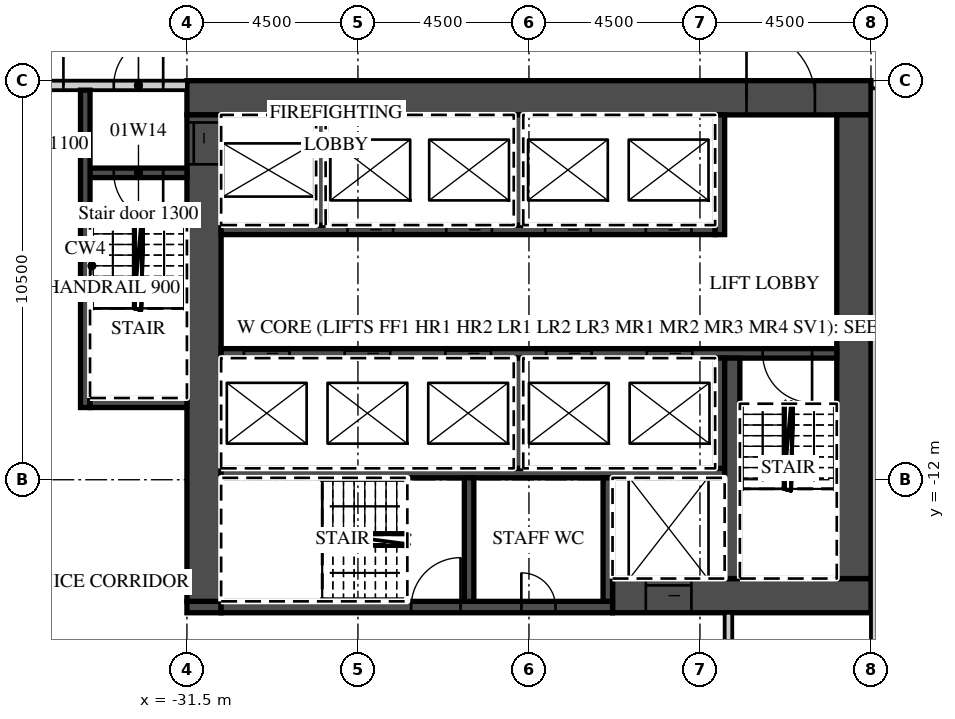
"""IFC4 building model, lengths in metres.
Left out: names, types, materials, properties, quantities, classifications, styles, units other than length and angle.
Written with IfcOpenShell. Run it as: python <this file> out.ifc"""

import sys

from ifc_helpers import new_model, si_unit, direction, frame, frame_2d, origin, place, context, subcontext, project, spatial, rectangle, extrude, element, fill, save


model = new_model("IFC4")
c1 = context("Model", 3, precision=1e-05, world=origin(), true_north=direction((0.0, 1.0)))
c2 = subcontext(c1, "Body", "Model", "MODEL_VIEW")
j1 = project(units=[si_unit("LENGTHUNIT", "METRE"), si_unit("PLANEANGLEUNIT", "RADIAN")], contexts=[c1])
p1 = place(None, origin())
s1 = spatial("IfcSite", under=j1, at=p1, CompositionType="ELEMENT")
p2 = place(p1, origin())
s2 = spatial("IfcBuilding", under=s1, at=p2, CompositionType="ELEMENT")
p3 = place(p2, frame((0.0, 0.0, 11.0)))
s3 = spatial("IfcBuildingStorey", under=s2, at=p3, CompositionType="ELEMENT", Elevation=11.0)
p4 = place(p3, frame((-31.5, -1.95, 0.0), z_axis=(0.0, 0.0, 1.0), x_axis=(1.0, 0.0, 0.0)))
e1 = element("IfcWall", 1, at=p4, inside=s3, PredefinedType="SHEAR", context=c2, shape_type="SweptSolid", body=[
    extrude(rectangle(XDim=18.0, YDim=0.9, at=frame_2d((9.0, 0.0))), origin(), (0.0, 0.0, 1.0), 5.55),
])
p5 = place(p4, frame((14.725, 0.0, 0.0)))
e2 = element("IfcOpeningElement", 2, at=p5, cuts=e1, PredefinedType="OPENING", context=c2, shape_type="SweptSolid", body=[
    extrude(rectangle(XDim=1.8, YDim=2.1, at=frame_2d((0.9, 1.05))), frame((0.0, 0.46, 0.0), z_axis=(0.0, -1.0, 0.0), x_axis=(1.0, 0.0, 0.0)), (0.0, 0.0, 1.0), 0.92),
])
p6 = place(p3, frame((-20.3, -15.05, 0.0), z_axis=(0.0, 0.0, 1.0), x_axis=(1.0, 0.0, 0.0)))
e3 = element("IfcWall", 3, at=p6, inside=s3, PredefinedType="SHEAR", context=c2, shape_type="SweptSolid", body=[
    extrude(rectangle(XDim=6.8, YDim=0.9, at=frame_2d((3.4, 0.0))), origin(), (0.0, 0.0, 1.0), 5.55),
])
p7 = place(p6, frame((0.875, 0.0, 0.0)))
e4 = element("IfcOpeningElement", 4, at=p7, cuts=e3, PredefinedType="OPENING", context=c2, shape_type="SweptSolid", body=[
    extrude(rectangle(XDim=1.2, YDim=2.1, at=frame_2d((0.6, 1.05))), frame((0.0, 0.46, 0.0), z_axis=(0.0, -1.0, 0.0), x_axis=(1.0, 0.0, 0.0)), (0.0, 0.0, 1.0), 0.92),
])
p8 = place(p3, frame((-31.5, -15.35, 0.0), z_axis=(0.0, 0.0, 1.0), x_axis=(1.0, 0.0, 0.0)))
e5 = element("IfcWall", 5, at=p8, inside=s3, PredefinedType="SHEAR", context=c2, shape_type="SweptSolid", body=[
    extrude(rectangle(XDim=0.9, YDim=0.3, at=frame_2d((0.45, 0.0))), origin(), (0.0, 0.0, 1.0), 5.55),
])
p9 = place(p3, frame((-30.6, -15.35, 0.0), z_axis=(0.0, 0.0, 1.0), x_axis=(1.0, 0.0, 0.0)))
e6 = element("IfcWall", 6, at=p9, inside=s3, PredefinedType="SHEAR", context=c2, shape_type="SweptSolid", body=[
    extrude(rectangle(XDim=10.3, YDim=0.3, at=frame_2d((5.15, 0.0))), origin(), (0.0, 0.0, 1.0), 5.55),
])
p10 = place(p9, frame((5.0, 0.0, 0.0)))
e7 = element("IfcOpeningElement", 7, at=p10, cuts=e6, PredefinedType="OPENING", context=c2, shape_type="SweptSolid", body=[
    extrude(rectangle(XDim=1.3, YDim=2.1, at=frame_2d((0.65, 1.05))), frame((0.0, 0.16, 0.0), z_axis=(0.0, -1.0, 0.0), x_axis=(1.0, 0.0, 0.0)), (0.0, 0.0, 1.0), 0.32),
])
p11 = place(p9, frame((7.9, 0.0, 0.0)))
e8 = element("IfcOpeningElement", 8, at=p11, cuts=e6, PredefinedType="OPENING", context=c2, shape_type="SweptSolid", body=[
    extrude(rectangle(XDim=0.9, YDim=2.1, at=frame_2d((0.45, 1.05))), frame((0.0, 0.16, 0.0), z_axis=(0.0, -1.0, 0.0), x_axis=(1.0, 0.0, 0.0)), (0.0, 0.0, 1.0), 0.32),
])
p12 = place(p3, frame((-31.05, -15.2, 0.0), z_axis=(0.0, 0.0, 1.0), x_axis=(0.0, 1.0, 0.0)))
e9 = element("IfcWall", 9, at=p12, inside=s3, PredefinedType="SHEAR", context=c2, shape_type="SweptSolid", body=[
    extrude(rectangle(XDim=12.8, YDim=0.9, at=frame_2d((6.4, 0.0))), origin(), (0.0, 0.0, 1.0), 5.55),
])
p13 = place(p12, frame((11.5, 0.0, 0.0)))
e10 = element("IfcOpeningElement", 10, at=p13, cuts=e9, PredefinedType="OPENING", context=c2, shape_type="SweptSolid", body=[
    extrude(rectangle(XDim=1.1, YDim=2.1, at=frame_2d((0.55, 1.05))), frame((0.0, 0.46, 0.0), z_axis=(0.0, -1.0, 0.0), x_axis=(1.0, 0.0, 0.0)), (0.0, 0.0, 1.0), 0.92),
])
p14 = place(p3, frame((-13.95, -14.6, 0.0), z_axis=(0.0, 0.0, 1.0), x_axis=(0.0, 1.0, 0.0)))
e11 = element("IfcWall", 11, at=p14, inside=s3, PredefinedType="SHEAR", context=c2, shape_type="SweptSolid", body=[
    extrude(rectangle(XDim=12.2, YDim=0.9, at=frame_2d((6.1, 0.0))), origin(), (0.0, 0.0, 1.0), 5.55),
])
p15 = place(p3, frame((-30.6, -5.425, 0.0), z_axis=(0.0, 0.0, 1.0), x_axis=(1.0, 0.0, 0.0)))
e12 = element("IfcWall", 12, at=p15, inside=s3, PredefinedType="SHEAR", context=c2, shape_type="SweptSolid", body=[
    extrude(rectangle(XDim=13.0, YDim=0.25, at=frame_2d((6.5, 0.0))), origin(), (0.0, 0.0, 1.0), 5.55),
])
p16 = place(p15, frame((3.325, 0.0, 0.0)))
e13 = element("IfcOpeningElement", 13, at=p16, cuts=e12, PredefinedType="OPENING", context=c2, shape_type="SweptSolid", body=[
    extrude(rectangle(XDim=1.2, YDim=2.1, at=frame_2d((0.6, 1.05))), frame((0.0, 0.135, 0.0), z_axis=(0.0, -1.0, 0.0), x_axis=(1.0, 0.0, 0.0)), (0.0, 0.0, 1.0), 0.27),
])
p17 = place(p15, frame((5.925, 0.0, 0.0)))
e14 = element("IfcOpeningElement", 14, at=p17, cuts=e12, PredefinedType="OPENING", context=c2, shape_type="SweptSolid", body=[
    extrude(rectangle(XDim=1.2, YDim=2.1, at=frame_2d((0.6, 1.05))), frame((0.0, 0.135, 0.0), z_axis=(0.0, -1.0, 0.0), x_axis=(1.0, 0.0, 0.0)), (0.0, 0.0, 1.0), 0.27),
])
p18 = place(p15, frame((8.525, 0.0, 0.0)))
e15 = element("IfcOpeningElement", 15, at=p18, cuts=e12, PredefinedType="OPENING", context=c2, shape_type="SweptSolid", body=[
    extrude(rectangle(XDim=1.2, YDim=2.1, at=frame_2d((0.6, 1.05))), frame((0.0, 0.135, 0.0), z_axis=(0.0, -1.0, 0.0), x_axis=(1.0, 0.0, 0.0)), (0.0, 0.0, 1.0), 0.27),
])
p19 = place(p15, frame((11.175, 0.0, 0.0)))
e16 = element("IfcOpeningElement", 16, at=p19, cuts=e12, PredefinedType="OPENING", context=c2, shape_type="SweptSolid", body=[
    extrude(rectangle(XDim=1.2, YDim=2.1, at=frame_2d((0.6, 1.05))), frame((0.0, 0.135, 0.0), z_axis=(0.0, -1.0, 0.0), x_axis=(1.0, 0.0, 0.0)), (0.0, 0.0, 1.0), 0.27),
])
p20 = place(p3, frame((-17.475, -5.55, 0.0), z_axis=(0.0, 0.0, 1.0), x_axis=(0.0, 1.0, 0.0)))
e17 = element("IfcWall", 17, at=p20, inside=s3, PredefinedType="SHEAR", context=c2, shape_type="SweptSolid", body=[
    extrude(rectangle(XDim=3.15, YDim=0.25, at=frame_2d((1.575, 0.0))), origin(), (0.0, 0.0, 1.0), 5.55),
])
for number, where, z_axis, x_axis in (
    (18, (-27.975, -5.3, 0.0), (0.0, 0.0, 1.0), (0.0, 1.0, 0.0)),
    (19, (-22.775, -5.3, 0.0), (0.0, 0.0, 1.0), (0.0, 1.0, 0.0)),
):
    element("IfcWall", number, at=place(p3, frame(where, z_axis=z_axis, x_axis=x_axis)), inside=s3, PredefinedType="SHEAR", context=c2, shape_type="SweptSolid", body=[
        extrude(rectangle(XDim=2.9, YDim=0.25, at=frame_2d((1.45, 0.0))), origin(), (0.0, 0.0, 1.0), 5.55),
    ])
p21 = place(p3, frame((-30.6, -8.675, 0.0), z_axis=(0.0, 0.0, 1.0), x_axis=(1.0, 0.0, 0.0)))
e20 = element("IfcWall", 20, at=p21, inside=s3, PredefinedType="SHEAR", context=c2, shape_type="SweptSolid", body=[
    extrude(rectangle(XDim=16.2, YDim=0.25, at=frame_2d((8.1, 0.0))), origin(), (0.0, 0.0, 1.0), 5.55),
])
p22 = place(p21, frame((0.6, 0.0, 0.0)))
e21 = element("IfcOpeningElement", 21, at=p22, cuts=e20, PredefinedType="OPENING", context=c2, shape_type="SweptSolid", body=[
    extrude(rectangle(XDim=1.2, YDim=2.1, at=frame_2d((0.6, 1.05))), frame((0.0, 0.135, 0.0), z_axis=(0.0, -1.0, 0.0), x_axis=(1.0, 0.0, 0.0)), (0.0, 0.0, 1.0), 0.27),
])
p23 = place(p21, frame((3.25, 0.0, 0.0)))
e22 = element("IfcOpeningElement", 22, at=p23, cuts=e20, PredefinedType="OPENING", context=c2, shape_type="SweptSolid", body=[
    extrude(rectangle(XDim=1.2, YDim=2.1, at=frame_2d((0.6, 1.05))), frame((0.0, 0.135, 0.0), z_axis=(0.0, -1.0, 0.0), x_axis=(1.0, 0.0, 0.0)), (0.0, 0.0, 1.0), 0.27),
])
p24 = place(p21, frame((5.9, 0.0, 0.0)))
e23 = element("IfcOpeningElement", 23, at=p24, cuts=e20, PredefinedType="OPENING", context=c2, shape_type="SweptSolid", body=[
    extrude(rectangle(XDim=1.2, YDim=2.1, at=frame_2d((0.6, 1.05))), frame((0.0, 0.135, 0.0), z_axis=(0.0, -1.0, 0.0), x_axis=(1.0, 0.0, 0.0)), (0.0, 0.0, 1.0), 0.27),
])
p25 = place(p21, frame((8.55, 0.0, 0.0)))
e24 = element("IfcOpeningElement", 24, at=p25, cuts=e20, PredefinedType="OPENING", context=c2, shape_type="SweptSolid", body=[
    extrude(rectangle(XDim=1.2, YDim=2.1, at=frame_2d((0.6, 1.05))), frame((0.0, 0.135, 0.0), z_axis=(0.0, -1.0, 0.0), x_axis=(1.0, 0.0, 0.0)), (0.0, 0.0, 1.0), 0.27),
])
p26 = place(p21, frame((11.2, 0.0, 0.0)))
e25 = element("IfcOpeningElement", 25, at=p26, cuts=e20, PredefinedType="OPENING", context=c2, shape_type="SweptSolid", body=[
    extrude(rectangle(XDim=1.2, YDim=2.1, at=frame_2d((0.6, 1.05))), frame((0.0, 0.135, 0.0), z_axis=(0.0, -1.0, 0.0), x_axis=(1.0, 0.0, 0.0)), (0.0, 0.0, 1.0), 0.27),
])
p27 = place(p21, frame((14.25, 0.0, 0.0)))
e26 = element("IfcOpeningElement", 26, at=p27, cuts=e20, PredefinedType="OPENING", context=c2, shape_type="SweptSolid", body=[
    extrude(rectangle(XDim=1.3, YDim=2.1, at=frame_2d((0.65, 1.05))), frame((0.0, 0.135, 0.0), z_axis=(0.0, -1.0, 0.0), x_axis=(1.0, 0.0, 0.0)), (0.0, 0.0, 1.0), 0.27),
])
p28 = place(p3, frame((-30.6, -11.825, 0.0), z_axis=(0.0, 0.0, 1.0), x_axis=(1.0, 0.0, 0.0)))
e27 = element("IfcWall", 27, at=p28, inside=s3, PredefinedType="SHEAR", context=c2, shape_type="SweptSolid", body=[
    extrude(rectangle(XDim=13.25, YDim=0.25, at=frame_2d((6.625, 0.0))), origin(), (0.0, 0.0, 1.0), 5.55),
])
for number, where, z_axis, x_axis in (
    (28, (-17.475, -11.7, 0.0), (0.0, 0.0, 1.0), (0.0, 1.0, 0.0)),
    (29, (-22.775, -11.7, 0.0), (0.0, 0.0, 1.0), (0.0, 1.0, 0.0)),
):
    element("IfcWall", number, at=place(p3, frame(where, z_axis=z_axis, x_axis=x_axis)), inside=s3, PredefinedType="SHEAR", context=c2, shape_type="SweptSolid", body=[
        extrude(rectangle(XDim=2.9, YDim=0.25, at=frame_2d((1.45, 0.0))), origin(), (0.0, 0.0, 1.0), 5.55),
    ])
p29 = place(p3, frame((-17.15, -14.6, 0.0), z_axis=(0.0, 0.0, 1.0), x_axis=(0.0, 1.0, 0.0)))
e30 = element("IfcWall", 30, at=p29, inside=s3, PredefinedType="SHEAR", context=c2, shape_type="SweptSolid", body=[
    extrude(rectangle(XDim=5.8, YDim=0.4, at=frame_2d((2.9, 0.0))), origin(), (0.0, 0.0, 1.0), 5.55),
])
for number, where, z_axis, x_axis in (
    (31, (-20.425, -15.2, 0.0), (0.0, 0.0, 1.0), (0.0, 1.0, 0.0)),
    (32, (-24.075, -15.2, 0.0), (0.0, 0.0, 1.0), (0.0, 1.0, 0.0)),
):
    element("IfcWall", number, at=place(p3, frame(where, z_axis=z_axis, x_axis=x_axis)), inside=s3, PredefinedType="SHEAR", context=c2, shape_type="SweptSolid", body=[
        extrude(rectangle(XDim=3.25, YDim=0.25, at=frame_2d((1.625, 0.0))), origin(), (0.0, 0.0, 1.0), 5.55),
    ])
p30 = place(p3, frame((-44.85, -1.625, 0.0), z_axis=(0.0, 0.0, 1.0), x_axis=(1.0, 0.0, 0.0)))
e33 = element("IfcWall", 33, at=p30, inside=s3, PredefinedType="PARTITIONING", context=c2, shape_type="SweptSolid", body=[
    extrude(rectangle(XDim=13.35, YDim=0.25, at=frame_2d((6.675, 0.0))), origin(), (0.0, 0.0, 1.0), 5.55),
])
p31 = place(p30, frame((11.425, 0.0, 0.0)))
e34 = element("IfcOpeningElement", 34, at=p31, cuts=e33, PredefinedType="OPENING", context=c2, shape_type="SweptSolid", body=[
    extrude(rectangle(XDim=1.3, YDim=2.1, at=frame_2d((0.65, 1.05))), frame((0.0, 0.135, 0.0), z_axis=(0.0, -1.0, 0.0), x_axis=(1.0, 0.0, 0.0)), (0.0, 0.0, 1.0), 0.27),
])
p32 = place(p30, frame((9.0, 0.0, 0.0)))
e35 = element("IfcOpeningElement", 35, at=p32, cuts=e33, PredefinedType="OPENING", context=c2, shape_type="SweptSolid", body=[
    extrude(rectangle(XDim=1.1, YDim=2.1, at=frame_2d((0.55, 1.05))), frame((0.0, 0.135, 0.0), z_axis=(0.0, -1.0, 0.0), x_axis=(1.0, 0.0, 0.0)), (0.0, 0.0, 1.0), 0.27),
])
p33 = place(p3, frame((-34.05, -3.925, 0.0), z_axis=(0.0, 0.0, 1.0), x_axis=(1.0, 0.0, 0.0)))
e36 = element("IfcWall", 36, at=p33, inside=s3, PredefinedType="SHEAR", context=c2, shape_type="SweptSolid", body=[
    extrude(rectangle(XDim=2.55, YDim=0.25, at=frame_2d((1.275, 0.0))), origin(), (0.0, 0.0, 1.0), 5.55),
])
p34 = place(p33, frame((0.625, 0.0, 0.0)))
e37 = element("IfcOpeningElement", 37, at=p34, cuts=e36, PredefinedType="OPENING", context=c2, shape_type="SweptSolid", body=[
    extrude(rectangle(XDim=1.3, YDim=2.1, at=frame_2d((0.65, 1.05))), frame((0.0, 0.135, 0.0), z_axis=(0.0, -1.0, 0.0), x_axis=(1.0, 0.0, 0.0)), (0.0, 0.0, 1.0), 0.27),
])
p35 = place(p3, frame((-34.175, -10.1, 0.0), z_axis=(0.0, 0.0, 1.0), x_axis=(0.0, 1.0, 0.0)))
e38 = element("IfcWall", 38, at=p35, inside=s3, PredefinedType="SHEAR", context=c2, shape_type="SweptSolid", body=[
    extrude(rectangle(XDim=8.35, YDim=0.25, at=frame_2d((4.175, 0.0))), origin(), (0.0, 0.0, 1.0), 5.55),
])
p36 = place(p3, frame((-34.05, -9.975, 0.0), z_axis=(0.0, 0.0, 1.0), x_axis=(1.0, 0.0, 0.0)))
e39 = element("IfcWall", 39, at=p36, inside=s3, PredefinedType="SHEAR", context=c2, shape_type="SweptSolid", body=[
    extrude(rectangle(XDim=2.55, YDim=0.25, at=frame_2d((1.275, 0.0))), origin(), (0.0, 0.0, 1.0), 5.55),
])
p37 = place(p3, frame((-17.25, -17.7, 0.0), z_axis=(0.0, 0.0, 1.0), x_axis=(0.0, 1.0, 0.0)))
e40 = element("IfcWall", 40, at=p37, inside=s3, PredefinedType="PARTITIONING", context=c2, shape_type="SweptSolid", body=[
    extrude(rectangle(XDim=2.2, YDim=0.2, at=frame_2d((1.1, 0.0))), origin(), (0.0, 0.0, 1.0), 5.55),
])
p38 = place(p3, frame((-13.4, -21.85, 0.0), z_axis=(0.0, 0.0, 1.0), x_axis=(0.0, 1.0, 0.0)))
e41 = element("IfcWall", 41, at=p38, inside=s3, PredefinedType="PARTITIONING", context=c2, shape_type="SweptSolid", body=[
    extrude(rectangle(XDim=20.15, YDim=0.2, at=frame_2d((10.075, 0.0))), origin(), (0.0, 0.0, 1.0), 5.55),
])
p39 = place(p22, origin())
e42 = element("IfcDoor", 42, at=p39, inside=s3, OperationType="SLIDING_TO_LEFT", PredefinedType="DOOR", context=c2, shape_type="SweptSolid", body=[
    extrude(rectangle(XDim=1.2, YDim=2.1, at=frame_2d((0.6, 1.05))), frame((0.0, 0.025, 0.0), z_axis=(0.0, -1.0, 0.0), x_axis=(1.0, 0.0, 0.0)), (0.0, 0.0, 1.0), 0.05),
])
fill(e21, e42)
p40 = place(p23, origin())
e43 = element("IfcDoor", 43, at=p40, inside=s3, OperationType="SLIDING_TO_RIGHT", PredefinedType="DOOR", context=c2, shape_type="SweptSolid", body=[
    extrude(rectangle(XDim=1.2, YDim=2.1, at=frame_2d((0.6, 1.05))), frame((0.0, 0.025, 0.0), z_axis=(0.0, -1.0, 0.0), x_axis=(1.0, 0.0, 0.0)), (0.0, 0.0, 1.0), 0.05),
])
fill(e22, e43)
p41 = place(p24, origin())
e44 = element("IfcDoor", 44, at=p41, inside=s3, OperationType="SLIDING_TO_RIGHT", PredefinedType="DOOR", context=c2, shape_type="SweptSolid", body=[
    extrude(rectangle(XDim=1.2, YDim=2.1, at=frame_2d((0.6, 1.05))), frame((0.0, 0.025, 0.0), z_axis=(0.0, -1.0, 0.0), x_axis=(1.0, 0.0, 0.0)), (0.0, 0.0, 1.0), 0.05),
])
fill(e23, e44)
p42 = place(p25, origin())
e45 = element("IfcDoor", 45, at=p42, inside=s3, OperationType="SLIDING_TO_LEFT", PredefinedType="DOOR", context=c2, shape_type="SweptSolid", body=[
    extrude(rectangle(XDim=1.2, YDim=2.1, at=frame_2d((0.6, 1.05))), frame((0.0, 0.025, 0.0), z_axis=(0.0, -1.0, 0.0), x_axis=(1.0, 0.0, 0.0)), (0.0, 0.0, 1.0), 0.05),
])
fill(e24, e45)
p43 = place(p26, origin())
e46 = element("IfcDoor", 46, at=p43, inside=s3, OperationType="SLIDING_TO_RIGHT", PredefinedType="DOOR", context=c2, shape_type="SweptSolid", body=[
    extrude(rectangle(XDim=1.2, YDim=2.1, at=frame_2d((0.6, 1.05))), frame((0.0, 0.025, 0.0), z_axis=(0.0, -1.0, 0.0), x_axis=(1.0, 0.0, 0.0)), (0.0, 0.0, 1.0), 0.05),
])
fill(e25, e46)
p44 = place(p16, origin())
e47 = element("IfcDoor", 47, at=p44, inside=s3, OperationType="SLIDING_TO_RIGHT", PredefinedType="DOOR", context=c2, shape_type="SweptSolid", body=[
    extrude(rectangle(XDim=1.2, YDim=2.1, at=frame_2d((0.6, 1.05))), frame((0.0, 0.025, 0.0), z_axis=(0.0, -1.0, 0.0), x_axis=(1.0, 0.0, 0.0)), (0.0, 0.0, 1.0), 0.05),
])
fill(e13, e47)
p45 = place(p17, origin())
e48 = element("IfcDoor", 48, at=p45, inside=s3, OperationType="SLIDING_TO_RIGHT", PredefinedType="DOOR", context=c2, shape_type="SweptSolid", body=[
    extrude(rectangle(XDim=1.2, YDim=2.1, at=frame_2d((0.6, 1.05))), frame((0.0, 0.025, 0.0), z_axis=(0.0, -1.0, 0.0), x_axis=(1.0, 0.0, 0.0)), (0.0, 0.0, 1.0), 0.05),
])
fill(e14, e48)
p46 = place(p18, origin())
e49 = element("IfcDoor", 49, at=p46, inside=s3, OperationType="SLIDING_TO_LEFT", PredefinedType="DOOR", context=c2, shape_type="SweptSolid", body=[
    extrude(rectangle(XDim=1.2, YDim=2.1, at=frame_2d((0.6, 1.05))), frame((0.0, 0.025, 0.0), z_axis=(0.0, -1.0, 0.0), x_axis=(1.0, 0.0, 0.0)), (0.0, 0.0, 1.0), 0.05),
])
fill(e15, e49)
p47 = place(p19, origin())
e50 = element("IfcDoor", 50, at=p47, inside=s3, OperationType="SLIDING_TO_RIGHT", PredefinedType="DOOR", context=c2, shape_type="SweptSolid", body=[
    extrude(rectangle(XDim=1.2, YDim=2.1, at=frame_2d((0.6, 1.05))), frame((0.0, 0.025, 0.0), z_axis=(0.0, -1.0, 0.0), x_axis=(1.0, 0.0, 0.0)), (0.0, 0.0, 1.0), 0.05),
])
fill(e16, e50)
p48 = place(p7, origin())
e51 = element("IfcDoor", 51, at=p48, inside=s3, OperationType="SLIDING_TO_LEFT", PredefinedType="DOOR", context=c2, shape_type="SweptSolid", body=[
    extrude(rectangle(XDim=1.2, YDim=2.1, at=frame_2d((0.6, 1.05))), frame((0.0, 0.025, 0.0), z_axis=(0.0, -1.0, 0.0), x_axis=(1.0, 0.0, 0.0)), (0.0, 0.0, 1.0), 0.05),
])
fill(e4, e51)
p49 = place(p13, origin())
e52 = element("IfcDoor", 52, at=p49, inside=s3, OperationType="SLIDING_TO_RIGHT", PredefinedType="DOOR", context=c2, shape_type="SweptSolid", body=[
    extrude(rectangle(XDim=1.1, YDim=2.1, at=frame_2d((0.55, 1.05))), frame((0.0, 0.025, 0.0), z_axis=(0.0, -1.0, 0.0), x_axis=(1.0, 0.0, 0.0)), (0.0, 0.0, 1.0), 0.05),
])
fill(e10, e52)
p50 = place(p5, origin())
e53 = element("IfcDoor", 53, at=p50, inside=s3, OperationType="DOUBLE_DOOR_DOUBLE_SWING", PredefinedType="DOOR", context=c2, shape_type="SweptSolid", body=[
    extrude(rectangle(XDim=1.8, YDim=2.1, at=frame_2d((0.9, 1.05))), frame((0.0, 0.025, 0.0), z_axis=(0.0, -1.0, 0.0), x_axis=(1.0, 0.0, 0.0)), (0.0, 0.0, 1.0), 0.05),
])
fill(e2, e53)
p51 = place(p31, origin())
e54 = element("IfcDoor", 54, at=p51, inside=s3, OperationType="SINGLE_SWING_RIGHT", PredefinedType="DOOR", context=c2, shape_type="SweptSolid", body=[
    extrude(rectangle(XDim=1.3, YDim=2.1, at=frame_2d((0.65, 1.05))), frame((0.0, 0.025, 0.0), z_axis=(0.0, -1.0, 0.0), x_axis=(1.0, 0.0, 0.0)), (0.0, 0.0, 1.0), 0.05),
])
fill(e34, e54)
p52 = place(p34, origin())
e55 = element("IfcDoor", 55, at=p52, inside=s3, OperationType="SINGLE_SWING_RIGHT", PredefinedType="DOOR", context=c2, shape_type="SweptSolid", body=[
    extrude(rectangle(XDim=1.3, YDim=2.1, at=frame_2d((0.65, 1.05))), frame((0.0, 0.025, 0.0), z_axis=(0.0, -1.0, 0.0), x_axis=(1.0, 0.0, 0.0)), (0.0, 0.0, 1.0), 0.05),
])
fill(e37, e55)
p53 = place(p32, origin())
e56 = element("IfcDoor", 56, at=p53, inside=s3, OperationType="SINGLE_SWING_RIGHT", PredefinedType="DOOR", context=c2, shape_type="SweptSolid", body=[
    extrude(rectangle(XDim=1.1, YDim=2.1, at=frame_2d((0.55, 1.05))), frame((0.0, 0.025, 0.0), z_axis=(0.0, -1.0, 0.0), x_axis=(1.0, 0.0, 0.0)), (0.0, 0.0, 1.0), 0.05),
])
fill(e35, e56)
p54 = place(p27, origin())
e57 = element("IfcDoor", 57, at=p54, inside=s3, OperationType="SINGLE_SWING_RIGHT", PredefinedType="DOOR", context=c2, shape_type="SweptSolid", body=[
    extrude(rectangle(XDim=1.3, YDim=2.1, at=frame_2d((0.65, 1.05))), frame((0.0, 0.025, 0.0), z_axis=(0.0, -1.0, 0.0), x_axis=(1.0, 0.0, 0.0)), (0.0, 0.0, 1.0), 0.05),
])
fill(e26, e57)
p55 = place(p10, origin())
e58 = element("IfcDoor", 58, at=p55, inside=s3, OperationType="SINGLE_SWING_RIGHT", PredefinedType="DOOR", context=c2, shape_type="SweptSolid", body=[
    extrude(rectangle(XDim=1.3, YDim=2.1, at=frame_2d((0.65, 1.05))), frame((0.0, 0.025, 0.0), z_axis=(0.0, -1.0, 0.0), x_axis=(1.0, 0.0, 0.0)), (0.0, 0.0, 1.0), 0.05),
])
fill(e7, e58)
p56 = place(p11, origin())
e59 = element("IfcDoor", 59, at=p56, inside=s3, OperationType="SINGLE_SWING_LEFT", PredefinedType="DOOR", context=c2, shape_type="SweptSolid", body=[
    extrude(rectangle(XDim=0.9, YDim=2.1, at=frame_2d((0.45, 1.05))), frame((0.0, 0.025, 0.0), z_axis=(0.0, -1.0, 0.0), x_axis=(1.0, 0.0, 0.0)), (0.0, 0.0, 1.0), 0.05),
])
fill(e8, e59)
save(model, sys.argv[1])
